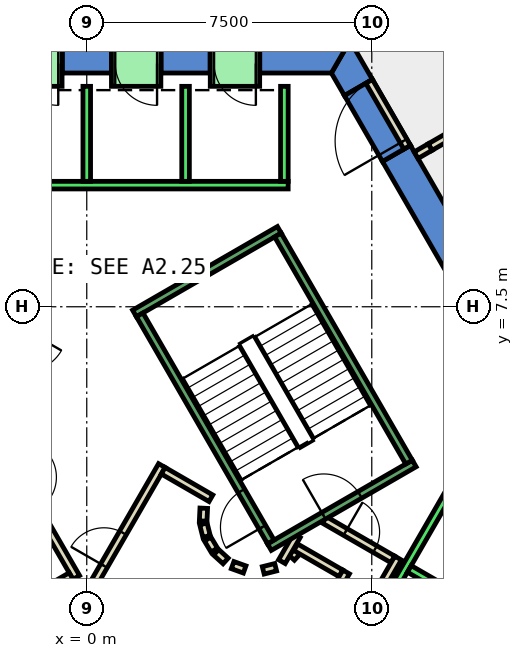
"""IFC4 building model, lengths in metres.
Left out: names, types, materials, properties, quantities, classifications, styles, units other than length and angle.
Written with IfcOpenShell. Run it as: python <this file> out.ifc"""

import sys

from ifc_helpers import new_model, si_unit, direction, frame, frame_2d, origin, place, context, subcontext, project, spatial, polyline, rectangle, outline, extrude, element, fill, save


model = new_model("IFC4")
c1 = context("Model", 3, precision=1e-05, world=origin(), true_north=direction((0.0, 1.0)))
c2 = subcontext(c1, "Body", "Model", "MODEL_VIEW")
j1 = project(units=[si_unit("LENGTHUNIT", "METRE"), si_unit("PLANEANGLEUNIT", "RADIAN")], contexts=[c1])
p1 = place(None, origin())
s1 = spatial("IfcSite", under=j1, at=p1, CompositionType="ELEMENT")
p2 = place(p1, origin())
s2 = spatial("IfcBuilding", under=s1, at=p2, CompositionType="ELEMENT")
p3 = place(p2, frame((0.0, 0.0, 124.4)))
s3 = spatial("IfcBuildingStorey", under=s2, at=p3, CompositionType="ELEMENT", Elevation=124.4)
p4 = place(p3, frame((0.0, 0.0, -0.4)))
e1 = element("IfcWall", 1, at=p4, inside=s3, PredefinedType="SHEAR", context=c2, shape_type="SweptSolid", body=[
    extrude(outline(polyline([(8.517, 11.748), (7.781, 11.323), (12.875, 2.5), (13.856, 2.5), (8.517, 11.748)])), origin(), (0.0, 0.0, 1.0), 4.2),
])
p5 = place(p3, frame((0.0, 0.0, -0.4)))
e2 = element("IfcWall", 2, at=p5, inside=s3, PredefinedType="SHEAR", context=c2, shape_type="SweptSolid", body=[
    extrude(outline(polyline([(6.781, 13.055), (7.517, 13.48), (6.928, 14.5), (6.437, 13.65), (6.781, 13.055)])), origin(), (0.0, 0.0, 1.0), 4.2),
])
p6 = place(p3, frame((0.0, 0.0, 3.6)))
e3 = element("IfcWall", 3, at=p6, inside=s3, PredefinedType="SHEAR", context=c2, shape_type="SweptSolid", body=[
    extrude(outline(polyline([(7.517, 13.48), (6.781, 13.055), (7.781, 11.323), (8.517, 11.748), (7.517, 13.48)])), origin(), (0.0, 0.0, 1.0), 0.2),
])
p7 = place(p3, frame((0.0, 0.0, -0.4)))
e4 = element("IfcWall", 4, at=p7, inside=s3, PredefinedType="SHEAR", context=c2, shape_type="SweptSolid", body=[
    extrude(outline(polyline([(4.55, 14.5), (4.55, 13.65), (6.437, 13.65), (6.928, 14.5), (4.55, 14.5)])), origin(), (0.0, 0.0, 1.0), 4.2),
])
p8 = place(p3, frame((0.0, 0.0, -0.4)))
e5 = element("IfcWall", 5, at=p8, inside=s3, PredefinedType="SHEAR", context=c2, shape_type="SweptSolid", body=[
    extrude(outline(polyline([(1.95, 14.5), (1.95, 13.65), (3.25, 13.65), (3.25, 14.5), (1.95, 14.5)])), origin(), (0.0, 0.0, 1.0), 4.2),
])
p9 = place(p3, frame((0.0, 0.0, -0.4)))
e6 = element("IfcWall", 6, at=p9, inside=s3, PredefinedType="SHEAR", context=c2, shape_type="SweptSolid", body=[
    extrude(outline(polyline([(-0.65, 14.5), (-0.65, 13.65), (0.65, 13.65), (0.65, 14.5), (-0.65, 14.5)])), origin(), (0.0, 0.0, 1.0), 4.2),
])
p10 = place(p3, frame((0.0, 0.0, 3.6)))
e7 = element("IfcWall", 7, at=p10, inside=s3, PredefinedType="SHEAR", context=c2, shape_type="SweptSolid", body=[
    extrude(outline(polyline([(3.25, 14.5), (3.25, 13.65), (4.55, 13.65), (4.55, 14.5), (3.25, 14.5)])), origin(), (0.0, 0.0, 1.0), 0.2),
])
p11 = place(p3, frame((0.0, 0.0, 3.6)))
e8 = element("IfcWall", 8, at=p11, inside=s3, PredefinedType="SHEAR", context=c2, shape_type="SweptSolid", body=[
    extrude(outline(polyline([(0.65, 14.5), (0.65, 13.65), (1.95, 13.65), (1.95, 14.5), (0.65, 14.5)])), origin(), (0.0, 0.0, 1.0), 0.2),
])
p12 = place(p3, frame((0.0, 0.0, 3.6)))
e9 = element("IfcWall", 9, at=p12, inside=s3, PredefinedType="SHEAR", context=c2, shape_type="SweptSolid", body=[
    extrude(outline(polyline([(-1.95, 14.5), (-1.95, 13.65), (-0.65, 13.65), (-0.65, 14.5), (-1.95, 14.5)])), origin(), (0.0, 0.0, 1.0), 0.2),
])
p13 = place(p3, frame((12.798, 13.873, 0.0), z_axis=(0.0, 0.0, 1.0), x_axis=(-0.866080799279, -0.499904039911, 0.0)))
e10 = element("IfcWall", 10, at=p13, inside=s3, PredefinedType="PARTITIONING", context=c2, shape_type="SweptSolid", body=[
    extrude(rectangle(XDim=4.345, YDim=0.2, at=frame_2d((2.172, 0.0))), origin(), (0.0, 0.0, 1.0), 3.8),
])
p14 = place(p3, frame((5.39, 0.898, 0.0), z_axis=(0.0, 0.0, 1.0), x_axis=(0.673828488714, 0.738887791073, 0.0)))
e11 = element("IfcWall", 11, at=p14, inside=s3, PredefinedType="PARTITIONING", context=c2, shape_type="SweptSolid", body=[
    extrude(rectangle(XDim=0.263, YDim=0.2, at=frame_2d((0.131, 0.0))), origin(), (0.0, 0.0, 1.0), 3.8),
])
p15 = place(p3, frame((5.499, 1.172, 0.0), z_axis=(0.0, 0.0, 1.0), x_axis=(0.866333505267, -0.499465972466, 0.0)))
e12 = element("IfcWall", 12, at=p15, inside=s3, PredefinedType="PARTITIONING", context=c2, shape_type="SweptSolid", body=[
    extrude(rectangle(XDim=1.374, YDim=0.2, at=frame_2d((0.687, 0.0))), origin(), (0.0, 0.0, 1.0), 3.8),
])
p16 = place(p3, frame((6.826, 0.522, 0.0), z_axis=(0.0, 0.0, 1.0), x_axis=(-0.500016722714, -0.866015748706, 0.0)))
e13 = element("IfcWall", 13, at=p16, inside=s3, PredefinedType="PARTITIONING", context=c2, shape_type="SweptSolid", body=[
    extrude(rectangle(XDim=1.7, YDim=0.2, at=frame_2d((0.85, 0.0))), origin(), (0.0, 0.0, 1.0), 3.8),
])
p17 = place(p3, frame((6.25, 1.894, 0.0), z_axis=(0.0, 0.0, 1.0), x_axis=(0.866043184279, -0.499969202016, 0.0)))
e14 = element("IfcWall", 14, at=p17, inside=s3, PredefinedType="PARTITIONING", context=c2, shape_type="SweptSolid", body=[
    extrude(rectangle(XDim=2.084, YDim=0.2, at=frame_2d((1.042, 0.0))), origin(), (0.0, 0.0, 1.0), 3.8),
])
p18 = place(p17, frame((0.642, 0.0, 0.0)))
e15 = element("IfcOpeningElement", 15, at=p18, cuts=e14, PredefinedType="OPENING", context=c2, shape_type="SweptSolid", body=[
    extrude(rectangle(XDim=0.9, YDim=2.1, at=frame_2d((0.45, 1.05))), frame((0.0, 0.11, 0.0), z_axis=(0.0, -1.0, 0.0), x_axis=(1.0, 0.0, 0.0)), (0.0, 0.0, 1.0), 0.22),
])
p19 = place(p3, frame((8.192, 0.888, 0.0), z_axis=(0.0, 0.0, 1.0), x_axis=(-0.499940625693, -0.866059680843, 0.0)))
e16 = element("IfcWall", 16, at=p19, inside=s3, PredefinedType="PARTITIONING", context=c2, shape_type="SweptSolid", body=[
    extrude(rectangle(XDim=2.68, YDim=0.2, at=frame_2d((1.34, 0.0))), origin(), (0.0, 0.0, 1.0), 3.8),
])
p20 = place(p3, frame((5.135, 0.793, 0.0), z_axis=(0.0, 0.0, 1.0), x_axis=(0.499526442893, 0.866298639529, 0.0)))
e17 = element("IfcWall", 17, at=p20, inside=s3, PredefinedType="PARTITIONING", context=c2, shape_type="SweptSolid", body=[
    extrude(rectangle(XDim=0.791, YDim=0.2, at=frame_2d((0.396, 0.0))), origin(), (0.0, 0.0, 1.0), 3.8),
])
p21 = place(p3, frame((-0.52, -1.0, 0.0), z_axis=(0.0, 0.0, 1.0), x_axis=(0.50011622646, 0.865958290007, 0.0)))
e18 = element("IfcWall", 18, at=p21, inside=s3, PredefinedType="PARTITIONING", context=c2, shape_type="SweptSolid", body=[
    extrude(rectangle(XDim=4.991, YDim=0.2, at=frame_2d((2.496, 0.0))), origin(), (0.0, 0.0, 1.0), 3.8),
])
p22 = place(p21, frame((1.945, 0.0, 0.0)))
e19 = element("IfcOpeningElement", 19, at=p22, cuts=e18, PredefinedType="OPENING", context=c2, shape_type="SweptSolid", body=[
    extrude(rectangle(XDim=1.0, YDim=2.1, at=frame_2d((0.5, 1.05))), frame((0.0, 0.11, 0.0), z_axis=(0.0, -1.0, 0.0), x_axis=(1.0, 0.0, 0.0)), (0.0, 0.0, 1.0), 0.22),
])
p23 = place(p3, frame((2.012, 3.186, 0.0), z_axis=(0.0, 0.0, 1.0), x_axis=(0.865891012941, -0.500232699559, 0.0)))
e20 = element("IfcWall", 20, at=p23, inside=s3, PredefinedType="PARTITIONING", context=c2, shape_type="SweptSolid", body=[
    extrude(rectangle(XDim=1.449, YDim=0.2, at=frame_2d((0.725, 0.0))), origin(), (0.0, 0.0, 1.0), 3.8),
])
p24 = place(p3, frame((3.079, 2.199, 0.0), z_axis=(0.0, 0.0, 1.0), x_axis=(-0.047771483479, -0.998858290933, 0.0)))
e21 = element("IfcWall", 21, at=p24, inside=s3, PredefinedType="PARTITIONING", context=c2, shape_type="SweptSolid", body=[
    extrude(rectangle(XDim=0.337, YDim=0.2, at=frame_2d((0.169, 0.0))), origin(), (0.0, 0.0, 1.0), 3.8),
])
p25 = place(p3, frame((3.07, 1.786, 0.0), z_axis=(0.0, 0.0, 1.0), x_axis=(0.242705583207, -0.970099994784, 0.0)))
e22 = element("IfcWall", 22, at=p25, inside=s3, PredefinedType="PARTITIONING", context=c2, shape_type="SweptSolid", body=[
    extrude(rectangle(XDim=0.338, YDim=0.2, at=frame_2d((0.169, 0.0))), origin(), (0.0, 0.0, 1.0), 3.8),
])
for number, where, z_axis, x_axis in (
    (23, (3.182, 1.388, 0.0), (0.0, 0.0, 1.0), (0.512, -0.859, 0.0)),
    (24, (3.404, 1.039, 0.0), (0.0, 0.0, 1.0), (0.74, -0.672, 0.0)),
):
    element("IfcWall", number, at=place(p3, frame(where, z_axis=z_axis, x_axis=x_axis)), inside=s3, PredefinedType="PARTITIONING", context=c2, shape_type="SweptSolid", body=[
        extrude(rectangle(XDim=0.338, YDim=0.2, at=frame_2d((0.169, 0.0))), origin(), (0.0, 0.0, 1.0), 3.8),
    ])
p26 = place(p3, frame((3.838, 0.702, 0.0), z_axis=(0.0, 0.0, 1.0), x_axis=(0.941035081519, -0.338308993895, 0.0)))
e25 = element("IfcWall", 25, at=p26, inside=s3, PredefinedType="PARTITIONING", context=c2, shape_type="SweptSolid", body=[
    extrude(rectangle(XDim=0.337, YDim=0.2, at=frame_2d((0.168, 0.0))), origin(), (0.0, 0.0, 1.0), 3.8),
])
p27 = place(p3, frame((4.644, 0.564, 0.0), z_axis=(0.0, 0.0, 1.0), x_axis=(0.969929076366, 0.243387729394, 0.0)))
e26 = element("IfcWall", 26, at=p27, inside=s3, PredefinedType="PARTITIONING", context=c2, shape_type="SweptSolid", body=[
    extrude(rectangle(XDim=0.337, YDim=0.2, at=frame_2d((0.168, 0.0))), origin(), (0.0, 0.0, 1.0), 3.8),
])
p28 = place(p3, frame((-2.771, 4.7, 0.0), z_axis=(0.0, 0.0, 1.0), x_axis=(0.499969479948, -0.866043023828, 0.0)))
e27 = element("IfcWall", 27, at=p28, inside=s3, PredefinedType="PARTITIONING", context=c2, shape_type="SweptSolid", body=[
    extrude(rectangle(XDim=4.99, YDim=0.2, at=frame_2d((2.495, 0.0))), origin(), (0.0, 0.0, 1.0), 3.8),
])
p29 = place(p28, frame((1.945, 0.0, 0.0)))
e28 = element("IfcOpeningElement", 28, at=p29, cuts=e27, PredefinedType="OPENING", context=c2, shape_type="SweptSolid", body=[
    extrude(rectangle(XDim=1.0, YDim=2.1, at=frame_2d((0.5, 1.05))), frame((0.0, 0.11, 0.0), z_axis=(0.0, -1.0, 0.0), x_axis=(1.0, 0.0, 0.0)), (0.0, 0.0, 1.0), 0.22),
])
p30 = place(p3, frame((-0.412, 0.414, 0.0), z_axis=(0.0, 0.0, 1.0), x_axis=(-0.866017369001, -0.500013916395, 0.0)))
e29 = element("IfcWall", 29, at=p30, inside=s3, PredefinedType="PARTITIONING", context=c2, shape_type="SweptSolid", body=[
    extrude(rectangle(XDim=1.45, YDim=0.2, at=frame_2d((0.725, 0.0))), origin(), (0.0, 0.0, 1.0), 3.8),
])
p31 = place(p3, frame((8.43, 11.698, 0.0), z_axis=(0.0, 0.0, 1.0), x_axis=(-0.50002537861, 0.866010750942, 0.0)))
e30 = element("IfcWall", 30, at=p31, inside=s3, PredefinedType="PARTITIONING", context=c2, shape_type="SweptSolid", body=[
    extrude(rectangle(XDim=2.0, YDim=0.2, at=frame_2d((1.0, 0.0))), origin(), (0.0, 0.0, 1.0), 2.4),
])
p32 = place(p31, frame((0.19, 0.0, 0.0)))
e31 = element("IfcOpeningElement", 31, at=p32, cuts=e30, PredefinedType="OPENING", context=c2, shape_type="SweptSolid", body=[
    extrude(rectangle(XDim=1.8, YDim=2.1, at=frame_2d((0.9, 1.05))), frame((0.0, 0.11, 0.0), z_axis=(0.0, -1.0, 0.0), x_axis=(1.0, 0.0, 0.0)), (0.0, 0.0, 1.0), 0.22),
])
p33 = place(p3, frame((9.035, 11.701, 0.0), z_axis=(0.0, 0.0, 1.0), x_axis=(-0.865544229481, -0.500832493767, 0.0)))
e32 = element("IfcWall", 32, at=p33, inside=s3, PredefinedType="PARTITIONING", context=c2, shape_type="SweptSolid", body=[
    extrude(rectangle(XDim=0.425, YDim=0.2, at=frame_2d((0.212, 0.0))), origin(), (0.0, 0.0, 1.0), 2.4),
])
p34 = place(p3, frame((5.3, 10.7, 0.0), z_axis=(0.0, 0.0, 1.0), x_axis=(-1.0, 0.0, 0.0)))
e33 = element("IfcWall", 33, at=p34, inside=s3, PredefinedType="STANDARD", context=c2, shape_type="SweptSolid", body=[
    extrude(rectangle(XDim=10.6, YDim=0.2, at=frame_2d((5.3, 0.0))), origin(), (0.0, 0.0, 1.0), 3.8),
])
for number, where, z_axis, x_axis in (
    (34, (5.2, 10.8, 0.0), (0.0, 0.0, 1.0), (0.0, 1.0, 0.0)),
    (35, (2.6, 10.8, 0.0), (0.0, 0.0, 1.0), (0.0, 1.0, 0.0)),
    (36, (0.0, 10.8, 0.0), (0.0, 0.0, 1.0), (0.0, 1.0, 0.0)),
):
    element("IfcWall", number, at=place(p3, frame(where, z_axis=z_axis, x_axis=x_axis)), inside=s3, PredefinedType="STANDARD", context=c2, shape_type="SweptSolid", body=[
        extrude(rectangle(XDim=2.5, YDim=0.2, at=frame_2d((1.25, 0.0))), origin(), (0.0, 0.0, 1.0), 3.8),
    ])
p35 = place(p3, frame((4.451, -6.19, 0.0), z_axis=(0.0, 0.0, 1.0), x_axis=(0.50000090737, 0.866024879913, 0.0)))
e37 = element("IfcWall", 37, at=p35, inside=s3, PredefinedType="STANDARD", context=c2, shape_type="SweptSolid", body=[
    extrude(rectangle(XDim=10.6, YDim=0.2, at=frame_2d((5.3, 0.0))), origin(), (0.0, 0.0, 1.0), 3.8),
])
p36 = place(p3, frame((8.488, 0.602, 0.0), z_axis=(0.0, 0.0, 1.0), x_axis=(0.866022959057, -0.500004234368, 0.0)))
e38 = element("IfcWall", 38, at=p36, inside=s3, PredefinedType="STANDARD", context=c2, shape_type="SweptSolid", body=[
    extrude(rectangle(XDim=2.5, YDim=0.2, at=frame_2d((1.25, 0.0))), origin(), (0.0, 0.0, 1.0), 3.8),
])
p37 = place(p3, frame((4.55, 13.9, 0.0), z_axis=(0.0, 0.0, 1.0), x_axis=(-1.0, 0.0, 0.0)))
e39 = element("IfcWall", 39, at=p37, inside=s3, PredefinedType="STANDARD", context=c2, shape_type="SweptSolid", body=[
    extrude(rectangle(XDim=1.3, YDim=1.2, at=frame_2d((0.65, 0.0))), origin(), (0.0, 0.0, 1.0), 2.4),
])
p38 = place(p37, frame((0.1, 0.0, 0.0)))
e40 = element("IfcOpeningElement", 40, at=p38, cuts=e39, PredefinedType="OPENING", context=c2, shape_type="SweptSolid", body=[
    extrude(rectangle(XDim=1.1, YDim=2.3, at=frame_2d((0.55, 1.15))), frame((0.0, 0.61, 0.0), z_axis=(0.0, -1.0, 0.0), x_axis=(1.0, 0.0, 0.0)), (0.0, 0.0, 1.0), 1.22),
])
p39 = place(p3, frame((1.95, 13.9, 0.0), z_axis=(0.0, 0.0, 1.0), x_axis=(-1.0, 0.0, 0.0)))
e41 = element("IfcWall", 41, at=p39, inside=s3, PredefinedType="STANDARD", context=c2, shape_type="SweptSolid", body=[
    extrude(rectangle(XDim=1.3, YDim=1.2, at=frame_2d((0.65, 0.0))), origin(), (0.0, 0.0, 1.0), 2.4),
])
p40 = place(p39, frame((0.1, 0.0, 0.0)))
e42 = element("IfcOpeningElement", 42, at=p40, cuts=e41, PredefinedType="OPENING", context=c2, shape_type="SweptSolid", body=[
    extrude(rectangle(XDim=1.1, YDim=2.3, at=frame_2d((0.55, 1.15))), frame((0.0, 0.61, 0.0), z_axis=(0.0, -1.0, 0.0), x_axis=(1.0, 0.0, 0.0)), (0.0, 0.0, 1.0), 1.22),
])
p41 = place(p3, frame((-0.65, 13.9, 0.0), z_axis=(0.0, 0.0, 1.0), x_axis=(-1.0, 0.0, 0.0)))
e43 = element("IfcWall", 43, at=p41, inside=s3, PredefinedType="STANDARD", context=c2, shape_type="SweptSolid", body=[
    extrude(rectangle(XDim=1.3, YDim=1.2, at=frame_2d((0.65, 0.0))), origin(), (0.0, 0.0, 1.0), 2.4),
])
p42 = place(p41, frame((0.1, 0.0, 0.0)))
e44 = element("IfcOpeningElement", 44, at=p42, cuts=e43, PredefinedType="OPENING", context=c2, shape_type="SweptSolid", body=[
    extrude(rectangle(XDim=1.1, YDim=2.3, at=frame_2d((0.55, 1.15))), frame((0.0, 0.61, 0.0), z_axis=(0.0, -1.0, 0.0), x_axis=(1.0, 0.0, 0.0)), (0.0, 0.0, 1.0), 1.22),
])
p43 = place(p3, frame((4.806, 1.176, 0.0), z_axis=(0.0, 0.0, 1.0), x_axis=(0.866059941101, 0.499940174841, 0.0)))
e45 = element("IfcWall", 45, at=p43, inside=s3, PredefinedType="STANDARD", context=c2, shape_type="SweptSolid", body=[
    extrude(rectangle(XDim=4.4, YDim=0.2, at=frame_2d((2.2, 0.0))), origin(), (0.0, 0.0, 1.0), 3.8),
])
p44 = place(p43, frame((1.65, 0.0, 0.0)))
e46 = element("IfcOpeningElement", 46, at=p44, cuts=e45, PredefinedType="OPENING", context=c2, shape_type="SweptSolid", body=[
    extrude(rectangle(XDim=1.1, YDim=2.2, at=frame_2d((0.55, 1.1))), frame((0.0, 0.11, 0.0), z_axis=(0.0, -1.0, 0.0), x_axis=(1.0, 0.0, 0.0)), (0.0, 0.0, 1.0), 0.22),
])
p45 = place(p3, frame((1.256, 7.324, 0.0), z_axis=(0.0, 0.0, 1.0), x_axis=(0.866046073146, 0.499964197906, 0.0)))
e47 = element("IfcWall", 47, at=p45, inside=s3, PredefinedType="STANDARD", context=c2, shape_type="SweptSolid", body=[
    extrude(rectangle(XDim=4.4, YDim=0.2, at=frame_2d((2.2, 0.0))), origin(), (0.0, 0.0, 1.0), 3.8),
])
p46 = place(p3, frame((4.843, 1.312, 0.0), z_axis=(0.0, 0.0, 1.0), x_axis=(-0.499963383562, 0.866046543262, 0.0)))
e48 = element("IfcWall", 48, at=p46, inside=s3, PredefinedType="STANDARD", context=c2, shape_type="SweptSolid", body=[
    extrude(rectangle(XDim=6.9, YDim=0.2, at=frame_2d((3.45, 0.0))), origin(), (0.0, 0.0, 1.0), 3.8),
])
p47 = place(p46, frame((0.45, 0.0, 0.0)))
e49 = element("IfcOpeningElement", 49, at=p47, cuts=e48, PredefinedType="OPENING", context=c2, shape_type="SweptSolid", body=[
    extrude(rectangle(XDim=1.1, YDim=2.2, at=frame_2d((0.55, 1.1))), frame((0.0, 0.11, 0.0), z_axis=(0.0, -1.0, 0.0), x_axis=(1.0, 0.0, 0.0)), (0.0, 0.0, 1.0), 0.22),
])
p48 = place(p3, frame((8.48, 3.412, 0.0), z_axis=(0.0, 0.0, 1.0), x_axis=(-0.499978703459, 0.866037698999, 0.0)))
e50 = element("IfcWall", 50, at=p48, inside=s3, PredefinedType="STANDARD", context=c2, shape_type="SweptSolid", body=[
    extrude(rectangle(XDim=6.9, YDim=0.2, at=frame_2d((3.45, 0.0))), origin(), (0.0, 0.0, 1.0), 3.8),
])
p49 = place(p22, origin())
e51 = element("IfcDoor", 51, at=p49, inside=s3, OperationType="SINGLE_SWING_LEFT", PredefinedType="DOOR", context=c2, shape_type="SweptSolid", body=[
    extrude(rectangle(XDim=1.0, YDim=2.1, at=frame_2d((0.5, 1.05))), frame((0.0, 0.025, 0.0), z_axis=(0.0, -1.0, 0.0), x_axis=(1.0, 0.0, 0.0)), (0.0, 0.0, 1.0), 0.05),
])
fill(e19, e51)
p50 = place(p18, origin())
e52 = element("IfcDoor", 52, at=p50, inside=s3, OperationType="SINGLE_SWING_LEFT", PredefinedType="DOOR", context=c2, shape_type="SweptSolid", body=[
    extrude(rectangle(XDim=0.9, YDim=2.1, at=frame_2d((0.45, 1.05))), frame((0.0, 0.025, 0.0), z_axis=(0.0, -1.0, 0.0), x_axis=(1.0, 0.0, 0.0)), (0.0, 0.0, 1.0), 0.05),
])
fill(e15, e52)
p51 = place(p32, origin())
e53 = element("IfcDoor", 53, at=p51, inside=s3, OperationType="DOUBLE_DOOR_SINGLE_SWING", PredefinedType="DOOR", context=c2, shape_type="SweptSolid", body=[
    extrude(rectangle(XDim=1.8, YDim=2.1, at=frame_2d((0.9, 1.05))), frame((0.0, 0.025, 0.0), z_axis=(0.0, -1.0, 0.0), x_axis=(1.0, 0.0, 0.0)), (0.0, 0.0, 1.0), 0.05),
])
fill(e31, e53)
p52 = place(p38, origin())
e54 = element("IfcDoor", 54, at=p52, inside=s3, OperationType="SLIDING_TO_LEFT", PredefinedType="DOOR", context=c2, shape_type="SweptSolid", body=[
    extrude(rectangle(XDim=1.1, YDim=2.3, at=frame_2d((0.55, 1.15))), frame((0.0, 0.025, 0.0), z_axis=(0.0, -1.0, 0.0), x_axis=(1.0, 0.0, 0.0)), (0.0, 0.0, 1.0), 0.05),
])
fill(e40, e54)
p53 = place(p40, origin())
e55 = element("IfcDoor", 55, at=p53, inside=s3, OperationType="SLIDING_TO_LEFT", PredefinedType="DOOR", context=c2, shape_type="SweptSolid", body=[
    extrude(rectangle(XDim=1.1, YDim=2.3, at=frame_2d((0.55, 1.15))), frame((0.0, 0.025, 0.0), z_axis=(0.0, -1.0, 0.0), x_axis=(1.0, 0.0, 0.0)), (0.0, 0.0, 1.0), 0.05),
])
fill(e42, e55)
p54 = place(p42, origin())
e56 = element("IfcDoor", 56, at=p54, inside=s3, OperationType="SLIDING_TO_LEFT", PredefinedType="DOOR", context=c2, shape_type="SweptSolid", body=[
    extrude(rectangle(XDim=1.1, YDim=2.3, at=frame_2d((0.55, 1.15))), frame((0.0, 0.025, 0.0), z_axis=(0.0, -1.0, 0.0), x_axis=(1.0, 0.0, 0.0)), (0.0, 0.0, 1.0), 0.05),
])
fill(e44, e56)
p55 = place(p47, origin())
e57 = element("IfcDoor", 57, at=p55, inside=s3, OperationType="SINGLE_SWING_LEFT", PredefinedType="DOOR", context=c2, shape_type="SweptSolid", body=[
    extrude(rectangle(XDim=1.1, YDim=2.2, at=frame_2d((0.55, 1.1))), frame((0.0, 0.025, 0.0), z_axis=(0.0, -1.0, 0.0), x_axis=(1.0, 0.0, 0.0)), (0.0, 0.0, 1.0), 0.05),
])
fill(e49, e57)
p56 = place(p44, origin())
e58 = element("IfcDoor", 58, at=p56, inside=s3, OperationType="SINGLE_SWING_LEFT", PredefinedType="DOOR", context=c2, shape_type="SweptSolid", body=[
    extrude(rectangle(XDim=1.1, YDim=2.2, at=frame_2d((0.55, 1.1))), frame((0.0, 0.025, 0.0), z_axis=(0.0, -1.0, 0.0), x_axis=(1.0, 0.0, 0.0)), (0.0, 0.0, 1.0), 0.05),
])
fill(e46, e58)
save(model, sys.argv[1])
